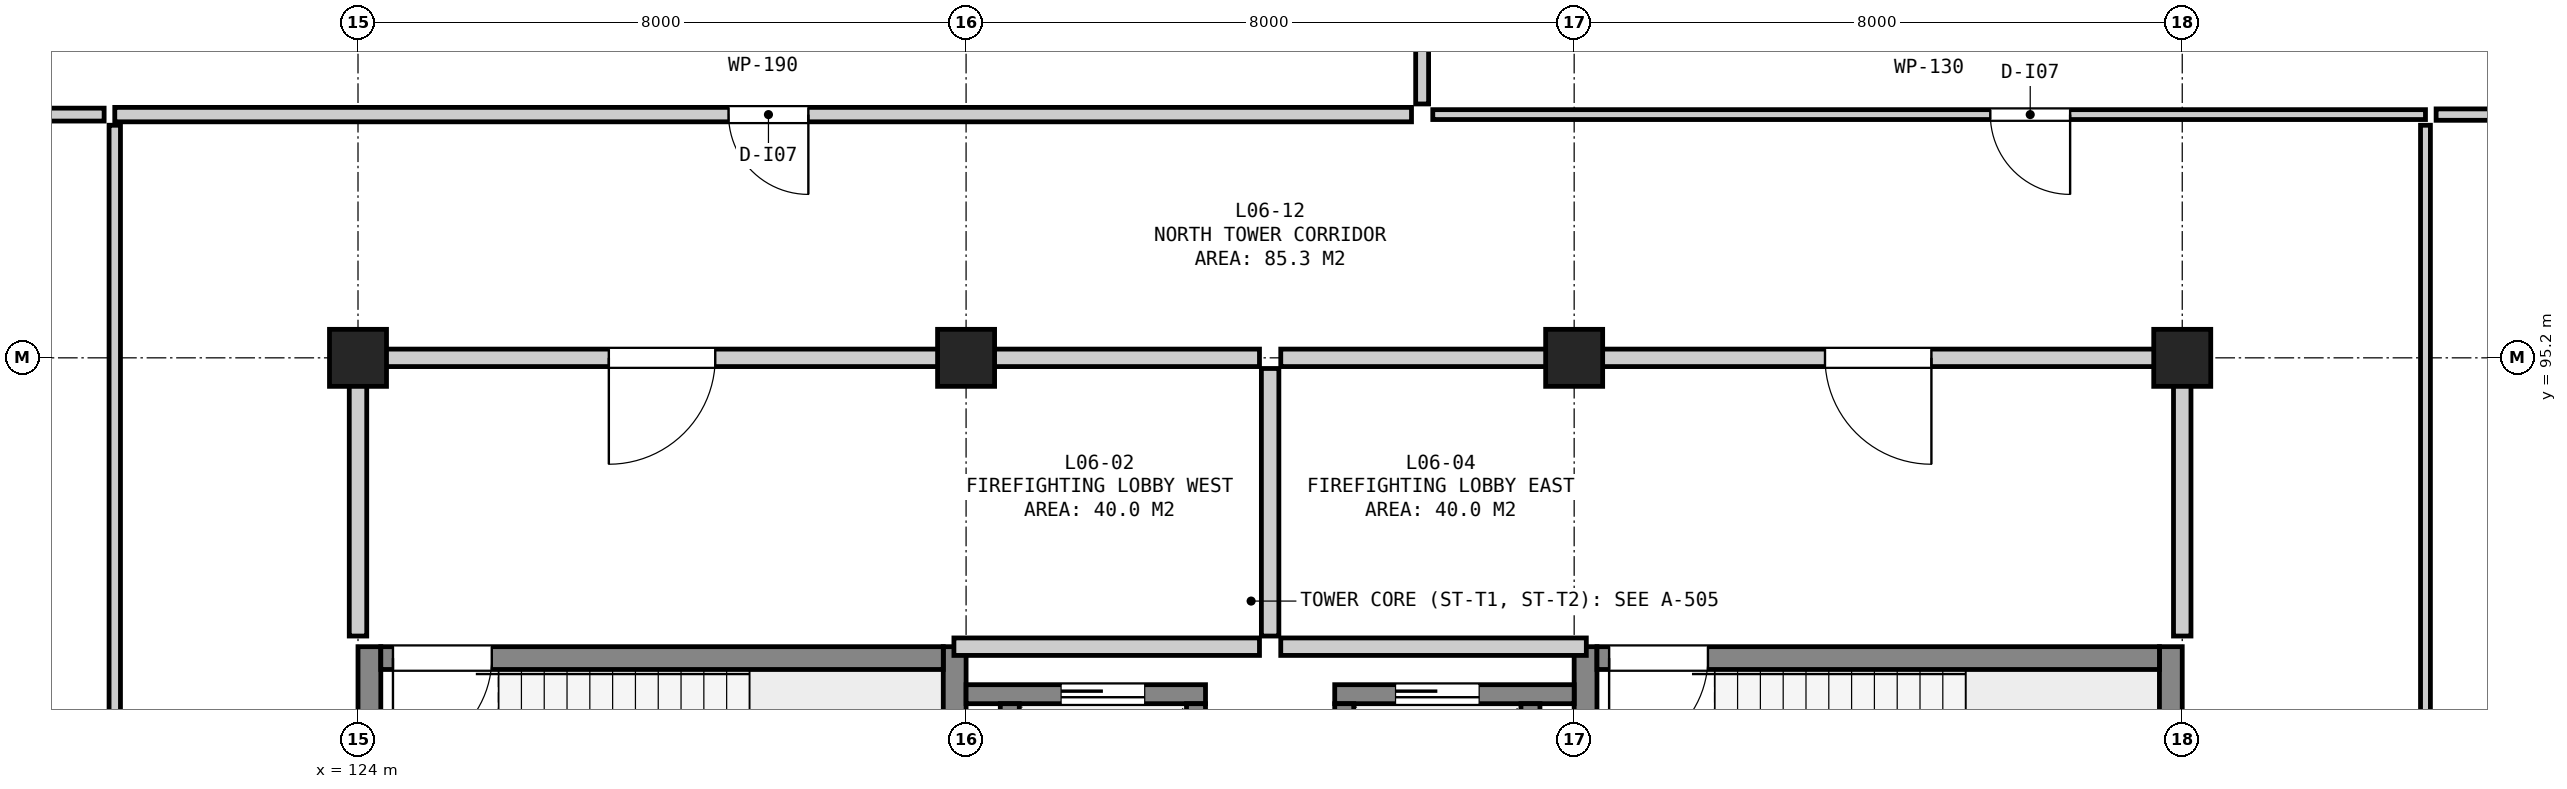
"""IFC4 building model, lengths in metres.
Left out: names, types, materials, properties, quantities, classifications, styles, units other than length and angle.
Written with IfcOpenShell. Run it as: python <this file> out.ifc"""

import sys

from ifc_helpers import new_model, si_unit, direction, frame, frame_2d, origin, origin_2d, place, context, subcontext, project, spatial, rectangle, extrude, element, fill, save


model = new_model("IFC4")
c1 = context("Model", 3, precision=1e-05, world=origin(), true_north=direction((0.0, 1.0)))
c2 = subcontext(c1, "Body", "Model", "MODEL_VIEW")
j1 = project(units=[si_unit("LENGTHUNIT", "METRE"), si_unit("PLANEANGLEUNIT", "RADIAN")], contexts=[c1])
p1 = place(None, origin())
s1 = spatial("IfcSite", under=j1, at=p1, CompositionType="ELEMENT")
p2 = place(p1, origin())
s2 = spatial("IfcBuilding", under=s1, at=p2, CompositionType="ELEMENT")
p3 = place(p2, frame((0.0, 0.0, 27.8)))
s3 = spatial("IfcBuildingStorey", under=s2, at=p3, CompositionType="ELEMENT", Elevation=27.8)
for number, where, z_axis, x_axis in (
    (1, (124.0, 95.2, 0.0), (0.0, 0.0, 1.0), (1.0, 0.0, 0.0)),
    (2, (132.0, 95.2, 0.0), (0.0, 0.0, 1.0), (1.0, 0.0, 0.0)),
    (3, (140.0, 95.2, 0.0), (0.0, 0.0, 1.0), (1.0, 0.0, 0.0)),
    (4, (148.0, 95.2, 0.0), (0.0, 0.0, 1.0), (1.0, 0.0, 0.0)),
):
    element("IfcColumn", number, at=place(p3, frame(where, z_axis=z_axis, x_axis=x_axis)), inside=s3, PredefinedType="COLUMN", context=c2, shape_type="SweptSolid", body=[
        extrude(rectangle(XDim=0.75, YDim=0.75, at=origin_2d()), origin(), (0.0, 0.0, 1.0), 3.9),
    ])
for number, where, z_axis, x_axis in (
    (5, (124.15, 87.2, 0.0), (0.0, 0.0, 1.0), (0.0, 1.0, 0.0)),
    (6, (131.85, 87.2, 0.0), (0.0, 0.0, 1.0), (0.0, 1.0, 0.0)),
):
    element("IfcWall", number, at=place(p3, frame(where, z_axis=z_axis, x_axis=x_axis)), inside=s3, PredefinedType="SHEAR", context=c2, shape_type="SweptSolid", body=[
        extrude(rectangle(XDim=4.2, YDim=0.3, at=frame_2d((2.1, 0.0))), origin(), (0.0, 0.0, 1.0), 3.62),
    ])
p4 = place(p3, frame((124.3, 91.25, 0.0), z_axis=(0.0, 0.0, 1.0), x_axis=(1.0, 0.0, 0.0)))
e7 = element("IfcWall", 7, at=p4, inside=s3, PredefinedType="SHEAR", context=c2, shape_type="SweptSolid", body=[
    extrude(rectangle(XDim=7.4, YDim=0.3, at=frame_2d((3.7, 0.0))), origin(), (0.0, 0.0, 1.0), 3.62),
])
p5 = place(p4, frame((0.16, 0.0, 0.0)))
e8 = element("IfcOpeningElement", 8, at=p5, cuts=e7, PredefinedType="OPENING", context=c2, shape_type="SweptSolid", body=[
    extrude(rectangle(XDim=1.3, YDim=2.18, at=frame_2d((0.65, 1.09))), frame((0.0, 0.162, 0.0), z_axis=(0.0, -1.0, 0.0), x_axis=(1.0, 0.0, 0.0)), (0.0, 0.0, 1.0), 0.324),
])
for number, where, z_axis, x_axis in (
    (9, (140.15, 87.2, 0.0), (0.0, 0.0, 1.0), (0.0, 1.0, 0.0)),
    (10, (147.85, 87.2, 0.0), (0.0, 0.0, 1.0), (0.0, 1.0, 0.0)),
):
    element("IfcWall", number, at=place(p3, frame(where, z_axis=z_axis, x_axis=x_axis)), inside=s3, PredefinedType="SHEAR", context=c2, shape_type="SweptSolid", body=[
        extrude(rectangle(XDim=4.2, YDim=0.3, at=frame_2d((2.1, 0.0))), origin(), (0.0, 0.0, 1.0), 3.62),
    ])
p6 = place(p3, frame((140.3, 91.25, 0.0), z_axis=(0.0, 0.0, 1.0), x_axis=(1.0, 0.0, 0.0)))
e11 = element("IfcWall", 11, at=p6, inside=s3, PredefinedType="SHEAR", context=c2, shape_type="SweptSolid", body=[
    extrude(rectangle(XDim=7.4, YDim=0.3, at=frame_2d((3.7, 0.0))), origin(), (0.0, 0.0, 1.0), 3.62),
])
p7 = place(p6, frame((0.16, 0.0, 0.0)))
e12 = element("IfcOpeningElement", 12, at=p7, cuts=e11, PredefinedType="OPENING", context=c2, shape_type="SweptSolid", body=[
    extrude(rectangle(XDim=1.3, YDim=2.18, at=frame_2d((0.65, 1.09))), frame((0.0, 0.162, 0.0), z_axis=(0.0, -1.0, 0.0), x_axis=(1.0, 0.0, 0.0)), (0.0, 0.0, 1.0), 0.324),
])
p8 = place(p3, frame((132.0, 90.775, 0.0), z_axis=(0.0, 0.0, 1.0), x_axis=(1.0, 0.0, 0.0)))
e13 = element("IfcWall", 13, at=p8, inside=s3, PredefinedType="SHEAR", context=c2, shape_type="SweptSolid", body=[
    extrude(rectangle(XDim=3.15, YDim=0.25, at=frame_2d((1.575, 0.0))), origin(), (0.0, 0.0, 1.0), 3.62),
])
p9 = place(p8, frame((1.25, 0.0, 0.0)))
e14 = element("IfcOpeningElement", 14, at=p9, cuts=e13, PredefinedType="OPENING", context=c2, shape_type="SweptSolid", body=[
    extrude(rectangle(XDim=1.1, YDim=2.15, at=frame_2d((0.55, 1.075))), frame((0.0, 0.137, 0.0), z_axis=(0.0, -1.0, 0.0), x_axis=(1.0, 0.0, 0.0)), (0.0, 0.0, 1.0), 0.274),
])
for number, where, z_axis, x_axis in (
    (15, (132.575, 87.75, 0.0), (0.0, 0.0, 1.0), (0.0, 1.0, 0.0)),
    (16, (135.025, 87.75, 0.0), (0.0, 0.0, 1.0), (0.0, 1.0, 0.0)),
):
    element("IfcWall", number, at=place(p3, frame(where, z_axis=z_axis, x_axis=x_axis)), inside=s3, PredefinedType="SHEAR", context=c2, shape_type="SweptSolid", body=[
        extrude(rectangle(XDim=2.9, YDim=0.25, at=frame_2d((1.45, 0.0))), origin(), (0.0, 0.0, 1.0), 3.62),
    ])
p10 = place(p3, frame((136.85, 90.775, 0.0), z_axis=(0.0, 0.0, 1.0), x_axis=(1.0, 0.0, 0.0)))
e17 = element("IfcWall", 17, at=p10, inside=s3, PredefinedType="SHEAR", context=c2, shape_type="SweptSolid", body=[
    extrude(rectangle(XDim=3.15, YDim=0.25, at=frame_2d((1.575, 0.0))), origin(), (0.0, 0.0, 1.0), 3.62),
])
p11 = place(p10, frame((0.8, 0.0, 0.0)))
e18 = element("IfcOpeningElement", 18, at=p11, cuts=e17, PredefinedType="OPENING", context=c2, shape_type="SweptSolid", body=[
    extrude(rectangle(XDim=1.1, YDim=2.15, at=frame_2d((0.55, 1.075))), frame((0.0, 0.137, 0.0), z_axis=(0.0, -1.0, 0.0), x_axis=(1.0, 0.0, 0.0)), (0.0, 0.0, 1.0), 0.274),
])
for number, where, z_axis, x_axis in (
    (19, (136.975, 87.75, 0.0), (0.0, 0.0, 1.0), (0.0, 1.0, 0.0)),
    (20, (139.425, 87.75, 0.0), (0.0, 0.0, 1.0), (0.0, 1.0, 0.0)),
):
    element("IfcWall", number, at=place(p3, frame(where, z_axis=z_axis, x_axis=x_axis)), inside=s3, PredefinedType="SHEAR", context=c2, shape_type="SweptSolid", body=[
        extrude(rectangle(XDim=2.9, YDim=0.25, at=frame_2d((1.45, 0.0))), origin(), (0.0, 0.0, 1.0), 3.62),
    ])
p12 = place(p3, frame((131.84, 91.4, 0.0), z_axis=(0.0, 0.0, 1.0), x_axis=(1.0, 0.0, 0.0)))
e21 = element("IfcWall", 21, at=p12, inside=s3, PredefinedType="SOLIDWALL", context=c2, shape_type="SweptSolid", body=[
    extrude(rectangle(XDim=4.02, YDim=0.23, at=frame_2d((2.01, 0.0))), origin(), (0.0, 0.0, 1.0), 3.62),
])
p13 = place(p3, frame((124.14, 95.2, 0.0), z_axis=(0.0, 0.0, 1.0), x_axis=(1.0, 0.0, 0.0)))
e22 = element("IfcWall", 22, at=p13, inside=s3, PredefinedType="SOLIDWALL", context=c2, shape_type="SweptSolid", body=[
    extrude(rectangle(XDim=11.72, YDim=0.23, at=frame_2d((5.86, 0.0))), origin(), (0.0, 0.0, 1.0), 3.135),
])
p14 = place(p13, frame((3.16, 0.0, 0.0)))
e23 = element("IfcOpeningElement", 23, at=p14, cuts=e22, PredefinedType="OPENING", context=c2, shape_type="SweptSolid", body=[
    extrude(rectangle(XDim=1.4, YDim=2.2, at=frame_2d((0.7, 1.1))), frame((0.0, 0.127, 0.0), z_axis=(0.0, -1.0, 0.0), x_axis=(1.0, 0.0, 0.0)), (0.0, 0.0, 1.0), 0.254),
])
p15 = place(p3, frame((124.0, 91.54, 0.0), z_axis=(0.0, 0.0, 1.0), x_axis=(0.0, 1.0, 0.0)))
e24 = element("IfcWall", 24, at=p15, inside=s3, PredefinedType="SOLIDWALL", context=c2, shape_type="SweptSolid", body=[
    extrude(rectangle(XDim=3.52, YDim=0.23, at=frame_2d((1.76, 0.0))), origin(), (0.0, 0.0, 1.0), 3.135),
])
p16 = place(p3, frame((136.0, 91.54, 0.0), z_axis=(0.0, 0.0, 1.0), x_axis=(0.0, 1.0, 0.0)))
e25 = element("IfcWall", 25, at=p16, inside=s3, PredefinedType="SOLIDWALL", context=c2, shape_type="SweptSolid", body=[
    extrude(rectangle(XDim=3.52, YDim=0.23, at=frame_2d((1.76, 0.0))), origin(), (0.0, 0.0, 1.0), 3.62),
])
p17 = place(p3, frame((136.14, 91.4, 0.0), z_axis=(0.0, 0.0, 1.0), x_axis=(1.0, 0.0, 0.0)))
e26 = element("IfcWall", 26, at=p17, inside=s3, PredefinedType="SOLIDWALL", context=c2, shape_type="SweptSolid", body=[
    extrude(rectangle(XDim=4.02, YDim=0.23, at=frame_2d((2.01, 0.0))), origin(), (0.0, 0.0, 1.0), 3.62),
])
p18 = place(p3, frame((136.14, 95.2, 0.0), z_axis=(0.0, 0.0, 1.0), x_axis=(1.0, 0.0, 0.0)))
e27 = element("IfcWall", 27, at=p18, inside=s3, PredefinedType="SOLIDWALL", context=c2, shape_type="SweptSolid", body=[
    extrude(rectangle(XDim=11.72, YDim=0.23, at=frame_2d((5.86, 0.0))), origin(), (0.0, 0.0, 1.0), 2.785),
])
p19 = place(p18, frame((7.16, 0.0, 0.0)))
e28 = element("IfcOpeningElement", 28, at=p19, cuts=e27, PredefinedType="OPENING", context=c2, shape_type="SweptSolid", body=[
    extrude(rectangle(XDim=1.4, YDim=2.2, at=frame_2d((0.7, 1.1))), frame((0.0, 0.127, 0.0), z_axis=(0.0, -1.0, 0.0), x_axis=(1.0, 0.0, 0.0)), (0.0, 0.0, 1.0), 0.254),
])
p20 = place(p3, frame((148.0, 91.54, 0.0), z_axis=(0.0, 0.0, 1.0), x_axis=(0.0, 1.0, 0.0)))
e29 = element("IfcWall", 29, at=p20, inside=s3, PredefinedType="SOLIDWALL", context=c2, shape_type="SweptSolid", body=[
    extrude(rectangle(XDim=3.52, YDim=0.23, at=frame_2d((1.76, 0.0))), origin(), (0.0, 0.0, 1.0), 3.035),
])
p21 = place(p3, frame((110.495, 98.4, 0.0), z_axis=(0.0, 0.0, 1.0), x_axis=(1.0, 0.0, 0.0)))
e30 = element("IfcWall", 30, at=p21, inside=s3, PredefinedType="PARTITIONING", context=c2, shape_type="SweptSolid", body=[
    extrude(rectangle(XDim=10.165, YDim=0.17, at=frame_2d((5.083, 0.0))), origin(), (0.0, 0.0, 1.0), 3.62),
])
p22 = place(p3, frame((120.8, 76.14, 0.0), z_axis=(0.0, 0.0, 1.0), x_axis=(0.0, 1.0, 0.0)))
e31 = element("IfcWall", 31, at=p22, inside=s3, PredefinedType="PARTITIONING", context=c2, shape_type="SweptSolid", body=[
    extrude(rectangle(XDim=22.12, YDim=0.15, at=frame_2d((11.06, 0.0))), origin(), (0.0, 0.0, 1.0), 3.62),
])
p23 = place(p22, frame((10.535, 0.0, 0.0)))
e32 = element("IfcOpeningElement", 32, at=p23, cuts=e31, PredefinedType="OPENING", context=c2, shape_type="SweptSolid", body=[
    extrude(rectangle(XDim=1.05, YDim=2.15, at=frame_2d((0.525, 1.075))), frame((0.0, 0.087, 0.0), z_axis=(0.0, -1.0, 0.0), x_axis=(1.0, 0.0, 0.0)), (0.0, 0.0, 1.0), 0.174),
])
p24 = place(p3, frame((151.34, 98.4, 0.0), z_axis=(0.0, 0.0, 1.0), x_axis=(1.0, 0.0, 0.0)))
e33 = element("IfcWall", 33, at=p24, inside=s3, PredefinedType="PARTITIONING", context=c2, shape_type="SweptSolid", body=[
    extrude(rectangle(XDim=16.565, YDim=0.15, at=frame_2d((8.282, 0.0))), origin(), (0.0, 0.0, 1.0), 3.62),
])
p25 = place(p3, frame((151.2, 76.14, 0.0), z_axis=(0.0, 0.0, 1.0), x_axis=(0.0, 1.0, 0.0)))
e34 = element("IfcWall", 34, at=p25, inside=s3, PredefinedType="PARTITIONING", context=c2, shape_type="SweptSolid", body=[
    extrude(rectangle(XDim=22.12, YDim=0.13, at=frame_2d((11.06, 0.0))), origin(), (0.0, 0.0, 1.0), 3.62),
])
p26 = place(p25, frame((10.535, 0.0, 0.0)))
e35 = element("IfcOpeningElement", 35, at=p26, cuts=e34, PredefinedType="OPENING", context=c2, shape_type="SweptSolid", body=[
    extrude(rectangle(XDim=1.05, YDim=2.15, at=frame_2d((0.525, 1.075))), frame((0.0, 0.077, 0.0), z_axis=(0.0, -1.0, 0.0), x_axis=(1.0, 0.0, 0.0)), (0.0, 0.0, 1.0), 0.154),
])
p27 = place(p3, frame((120.8, 98.4, 0.0), z_axis=(0.0, 0.0, 1.0), x_axis=(1.0, 0.0, 0.0)))
e36 = element("IfcWall", 36, at=p27, inside=s3, PredefinedType="PARTITIONING", context=c2, shape_type="SweptSolid", body=[
    extrude(rectangle(XDim=17.06, YDim=0.19, at=frame_2d((8.53, 0.0))), origin(), (0.0, 0.0, 1.0), 3.62),
])
p28 = place(p27, frame((8.075, 0.0, 0.0)))
e37 = element("IfcOpeningElement", 37, at=p28, cuts=e36, PredefinedType="OPENING", context=c2, shape_type="SweptSolid", body=[
    extrude(rectangle(XDim=1.05, YDim=2.15, at=frame_2d((0.525, 1.075))), frame((0.0, 0.107, 0.0), z_axis=(0.0, -1.0, 0.0), x_axis=(1.0, 0.0, 0.0)), (0.0, 0.0, 1.0), 0.214),
])
p29 = place(p3, frame((138.0, 98.54, 0.0), z_axis=(0.0, 0.0, 1.0), x_axis=(0.0, 1.0, 0.0)))
e38 = element("IfcWall", 38, at=p29, inside=s3, PredefinedType="PARTITIONING", context=c2, shape_type="SweptSolid", body=[
    extrude(rectangle(XDim=16.475, YDim=0.17, at=frame_2d((8.237, 0.0))), origin(), (0.0, 0.0, 1.0), 3.62),
])
p30 = place(p3, frame((138.14, 98.4, 0.0), z_axis=(0.0, 0.0, 1.0), x_axis=(1.0, 0.0, 0.0)))
e39 = element("IfcWall", 39, at=p30, inside=s3, PredefinedType="PARTITIONING", context=c2, shape_type="SweptSolid", body=[
    extrude(rectangle(XDim=13.06, YDim=0.13, at=frame_2d((6.53, 0.0))), origin(), (0.0, 0.0, 1.0), 3.62),
])
p31 = place(p30, frame((7.335, 0.0, 0.0)))
e40 = element("IfcOpeningElement", 40, at=p31, cuts=e39, PredefinedType="OPENING", context=c2, shape_type="SweptSolid", body=[
    extrude(rectangle(XDim=1.05, YDim=2.15, at=frame_2d((0.525, 1.075))), frame((0.0, 0.077, 0.0), z_axis=(0.0, -1.0, 0.0), x_axis=(1.0, 0.0, 0.0)), (0.0, 0.0, 1.0), 0.154),
])
p32 = place(p5, frame((1.3, 0.0, 0.0), z_axis=(0.0, 0.0, 1.0), x_axis=(-1.0, 0.0, 0.0)))
e41 = element("IfcDoor", 41, at=p32, inside=s3, OperationType="SINGLE_SWING_RIGHT", PredefinedType="DOOR", context=c2, shape_type="SweptSolid", body=[
    extrude(rectangle(XDim=1.3, YDim=2.18, at=frame_2d((0.65, 1.09))), frame((0.0, 0.025, 0.0), z_axis=(0.0, -1.0, 0.0), x_axis=(1.0, 0.0, 0.0)), (0.0, 0.0, 1.0), 0.05),
])
fill(e8, e41)
p33 = place(p7, frame((1.3, 0.0, 0.0), z_axis=(0.0, 0.0, 1.0), x_axis=(-1.0, 0.0, 0.0)))
e42 = element("IfcDoor", 42, at=p33, inside=s3, OperationType="SINGLE_SWING_RIGHT", PredefinedType="DOOR", context=c2, shape_type="SweptSolid", body=[
    extrude(rectangle(XDim=1.3, YDim=2.18, at=frame_2d((0.65, 1.09))), frame((0.0, 0.025, 0.0), z_axis=(0.0, -1.0, 0.0), x_axis=(1.0, 0.0, 0.0)), (0.0, 0.0, 1.0), 0.05),
])
fill(e12, e42)
p34 = place(p9, origin())
e43 = element("IfcDoor", 43, at=p34, inside=s3, OperationType="SLIDING_TO_LEFT", PredefinedType="DOOR", context=c2, shape_type="SweptSolid", body=[
    extrude(rectangle(XDim=1.1, YDim=2.15, at=frame_2d((0.55, 1.075))), frame((0.0, 0.025, 0.0), z_axis=(0.0, -1.0, 0.0), x_axis=(1.0, 0.0, 0.0)), (0.0, 0.0, 1.0), 0.05),
])
fill(e14, e43)
p35 = place(p11, origin())
e44 = element("IfcDoor", 44, at=p35, inside=s3, OperationType="SLIDING_TO_LEFT", PredefinedType="DOOR", context=c2, shape_type="SweptSolid", body=[
    extrude(rectangle(XDim=1.1, YDim=2.15, at=frame_2d((0.55, 1.075))), frame((0.0, 0.025, 0.0), z_axis=(0.0, -1.0, 0.0), x_axis=(1.0, 0.0, 0.0)), (0.0, 0.0, 1.0), 0.05),
])
fill(e18, e44)
p36 = place(p14, frame((1.4, 0.0, 0.0), z_axis=(0.0, 0.0, 1.0), x_axis=(-1.0, 0.0, 0.0)))
e45 = element("IfcDoor", 45, at=p36, inside=s3, OperationType="SINGLE_SWING_RIGHT", PredefinedType="DOOR", context=c2, shape_type="SweptSolid", body=[
    extrude(rectangle(XDim=1.4, YDim=2.2, at=frame_2d((0.7, 1.1))), frame((0.0, 0.025, 0.0), z_axis=(0.0, -1.0, 0.0), x_axis=(1.0, 0.0, 0.0)), (0.0, 0.0, 1.0), 0.05),
])
fill(e23, e45)
p37 = place(p19, frame((1.4, 0.0, 0.0), z_axis=(0.0, 0.0, 1.0), x_axis=(-1.0, 0.0, 0.0)))
e46 = element("IfcDoor", 46, at=p37, inside=s3, OperationType="SINGLE_SWING_LEFT", PredefinedType="DOOR", context=c2, shape_type="SweptSolid", body=[
    extrude(rectangle(XDim=1.4, YDim=2.2, at=frame_2d((0.7, 1.1))), frame((0.0, 0.025, 0.0), z_axis=(0.0, -1.0, 0.0), x_axis=(1.0, 0.0, 0.0)), (0.0, 0.0, 1.0), 0.05),
])
fill(e28, e46)
p38 = place(p28, frame((1.05, 0.0, 0.0), z_axis=(0.0, 0.0, 1.0), x_axis=(-1.0, 0.0, 0.0)))
e47 = element("IfcDoor", 47, at=p38, inside=s3, OperationType="SINGLE_SWING_LEFT", PredefinedType="DOOR", context=c2, shape_type="SweptSolid", body=[
    extrude(rectangle(XDim=1.05, YDim=2.15, at=frame_2d((0.525, 1.075))), frame((0.0, 0.025, 0.0), z_axis=(0.0, -1.0, 0.0), x_axis=(1.0, 0.0, 0.0)), (0.0, 0.0, 1.0), 0.05),
])
fill(e37, e47)
p39 = place(p31, frame((1.05, 0.0, 0.0), z_axis=(0.0, 0.0, 1.0), x_axis=(-1.0, 0.0, 0.0)))
e48 = element("IfcDoor", 48, at=p39, inside=s3, OperationType="SINGLE_SWING_LEFT", PredefinedType="DOOR", context=c2, shape_type="SweptSolid", body=[
    extrude(rectangle(XDim=1.05, YDim=2.15, at=frame_2d((0.525, 1.075))), frame((0.0, 0.025, 0.0), z_axis=(0.0, -1.0, 0.0), x_axis=(1.0, 0.0, 0.0)), (0.0, 0.0, 1.0), 0.05),
])
fill(e40, e48)
save(model, sys.argv[1])
